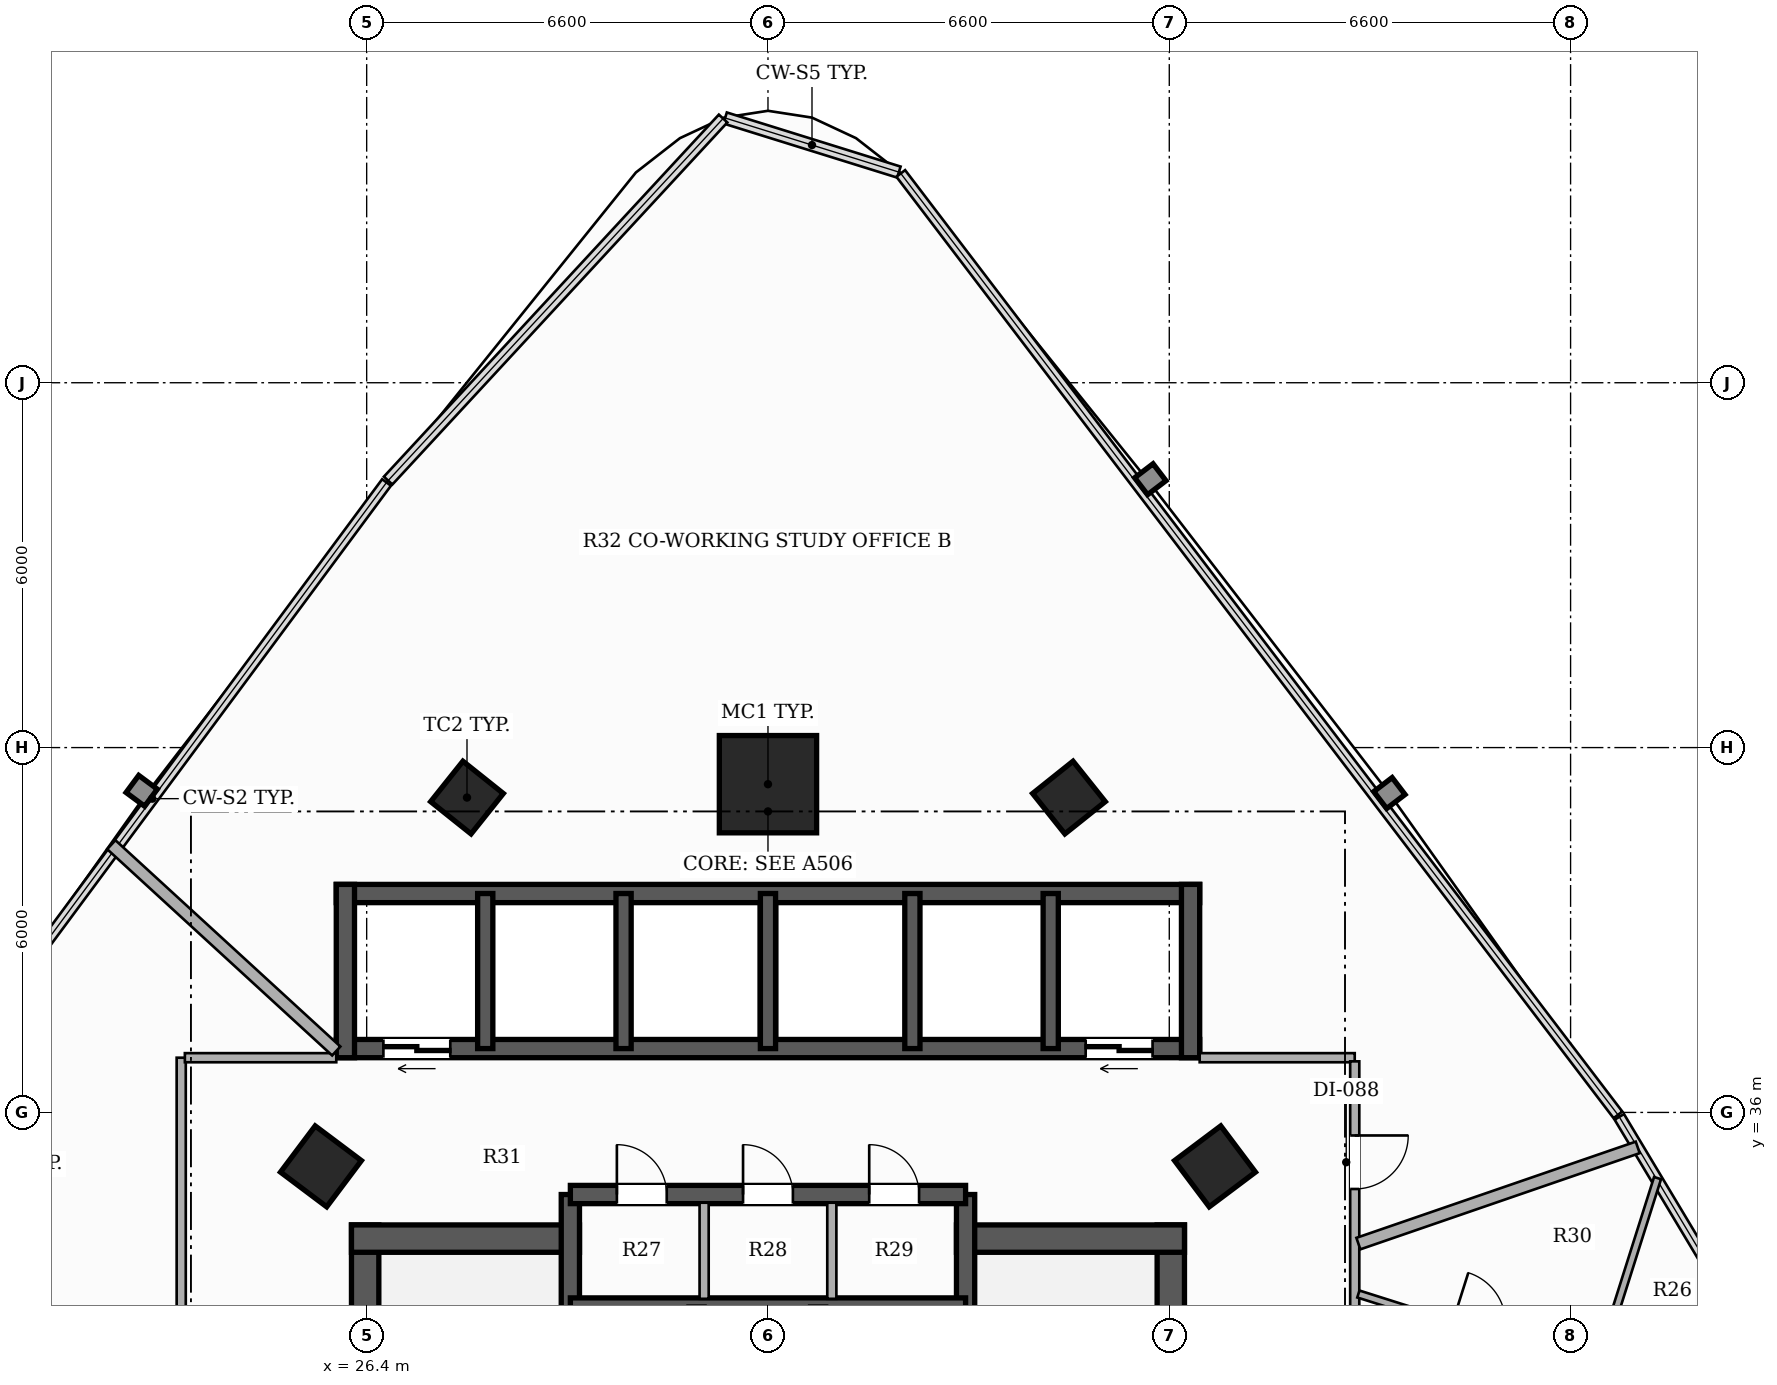
"""IFC4 building model, lengths in metres.
Left out: names, types, materials, properties, quantities, classifications, styles, units other than length and angle.
Written with IfcOpenShell. Run it as: python <this file> out.ifc"""

import sys

from ifc_helpers import new_model, si_unit, direction, frame, frame_2d, origin, origin_2d, place, context, subcontext, project, spatial, rectangle, hollow_rectangle, extrude, element, fill, save


model = new_model("IFC4")
c1 = context("Model", 3, precision=1e-05, world=origin(), true_north=direction((0.0, 1.0)))
c2 = subcontext(c1, "Body", "Model", "MODEL_VIEW")
j1 = project(units=[si_unit("LENGTHUNIT", "METRE"), si_unit("PLANEANGLEUNIT", "RADIAN")], contexts=[c1])
p1 = place(None, origin())
s1 = spatial("IfcSite", under=j1, at=p1, CompositionType="ELEMENT")
p2 = place(p1, origin())
s2 = spatial("IfcBuilding", under=s1, at=p2, CompositionType="ELEMENT")
p3 = place(p2, frame((0.0, 0.0, 36.8)))
s3 = spatial("IfcBuildingStorey", under=s2, at=p3, CompositionType="ELEMENT", Elevation=36.8)
p4 = place(p3, frame((26.375, 26.45, 0.0), z_axis=(0.0, 0.0, 1.0), x_axis=(0.0, 1.0, 0.0)))
e1 = element("IfcWall", 1, at=p4, inside=s3, PredefinedType="SHEAR", context=c2, shape_type="SweptSolid", body=[
    extrude(rectangle(XDim=7.7, YDim=0.45, at=frame_2d((3.85, 0.0))), origin(), (0.0, 0.0, 1.0), 3.3),
])
p5 = place(p3, frame((26.15, 33.925, 0.0), z_axis=(0.0, 0.0, 1.0), x_axis=(1.0, 0.0, 0.0)))
e2 = element("IfcWall", 2, at=p5, inside=s3, PredefinedType="SHEAR", context=c2, shape_type="SweptSolid", body=[
    extrude(rectangle(XDim=3.75, YDim=0.45, at=frame_2d((1.875, 0.0))), origin(), (0.0, 0.0, 1.0), 3.3),
])
p6 = place(p3, frame((39.625, 26.45, 0.0), z_axis=(0.0, 0.0, 1.0), x_axis=(0.0, 1.0, 0.0)))
e3 = element("IfcWall", 3, at=p6, inside=s3, PredefinedType="SHEAR", context=c2, shape_type="SweptSolid", body=[
    extrude(rectangle(XDim=7.7, YDim=0.45, at=frame_2d((3.85, 0.0))), origin(), (0.0, 0.0, 1.0), 3.3),
])
p7 = place(p3, frame((36.1, 33.925, 0.0), z_axis=(0.0, 0.0, 1.0), x_axis=(1.0, 0.0, 0.0)))
e4 = element("IfcWall", 4, at=p7, inside=s3, PredefinedType="SHEAR", context=c2, shape_type="SweptSolid", body=[
    extrude(rectangle(XDim=3.75, YDim=0.45, at=frame_2d((1.875, 0.0))), origin(), (0.0, 0.0, 1.0), 3.3),
])
p8 = place(p3, frame((29.75, 26.45, 0.0), z_axis=(0.0, 0.0, 1.0), x_axis=(0.0, 1.0, 0.0)))
e5 = element("IfcWall", 5, at=p8, inside=s3, PredefinedType="SHEAR", context=c2, shape_type="SweptSolid", body=[
    extrude(rectangle(XDim=8.2, YDim=0.3, at=frame_2d((4.1, 0.0))), origin(), (0.0, 0.0, 1.0), 3.3),
])
p9 = place(p8, frame((0.6, 0.0, 0.0)))
e6 = element("IfcOpeningElement", 6, at=p9, cuts=e5, PredefinedType="OPENING", context=c2, shape_type="SweptSolid", body=[
    extrude(rectangle(XDim=1.05, YDim=2.15, at=frame_2d((0.525, 1.075))), frame((0.0, 0.16, 0.0), z_axis=(0.0, -1.0, 0.0), x_axis=(1.0, 0.0, 0.0)), (0.0, 0.0, 1.0), 0.32),
])
p10 = place(p3, frame((36.25, 26.45, 0.0), z_axis=(0.0, 0.0, 1.0), x_axis=(0.0, 1.0, 0.0)))
e7 = element("IfcWall", 7, at=p10, inside=s3, PredefinedType="SHEAR", context=c2, shape_type="SweptSolid", body=[
    extrude(rectangle(XDim=8.2, YDim=0.3, at=frame_2d((4.1, 0.0))), origin(), (0.0, 0.0, 1.0), 3.3),
])
p11 = place(p10, frame((0.6, 0.0, 0.0)))
e8 = element("IfcOpeningElement", 8, at=p11, cuts=e7, PredefinedType="OPENING", context=c2, shape_type="SweptSolid", body=[
    extrude(rectangle(XDim=1.05, YDim=2.15, at=frame_2d((0.525, 1.075))), frame((0.0, 0.16, 0.0), z_axis=(0.0, -1.0, 0.0), x_axis=(1.0, 0.0, 0.0)), (0.0, 0.0, 1.0), 0.32),
])
p12 = place(p3, frame((29.75, 32.8, 0.0), z_axis=(0.0, 0.0, 1.0), x_axis=(1.0, 0.0, 0.0)))
e9 = element("IfcWall", 9, at=p12, inside=s3, PredefinedType="SHEAR", context=c2, shape_type="SweptSolid", body=[
    extrude(rectangle(XDim=6.5, YDim=0.3, at=frame_2d((3.25, 0.0))), origin(), (0.0, 0.0, 1.0), 3.3),
])
p13 = place(p3, frame((29.75, 34.65, 0.0), z_axis=(0.0, 0.0, 1.0), x_axis=(1.0, 0.0, 0.0)))
e10 = element("IfcWall", 10, at=p13, inside=s3, PredefinedType="SHEAR", context=c2, shape_type="SweptSolid", body=[
    extrude(rectangle(XDim=6.5, YDim=0.3, at=frame_2d((3.25, 0.0))), origin(), (0.0, 0.0, 1.0), 3.3),
])
p14 = place(p13, frame((0.765, 0.0, 0.0)))
e11 = element("IfcOpeningElement", 11, at=p14, cuts=e10, PredefinedType="OPENING", context=c2, shape_type="SweptSolid", body=[
    extrude(rectangle(XDim=0.82, YDim=2.1, at=frame_2d((0.41, 1.05))), frame((0.0, 0.16, 0.0), z_axis=(0.0, -1.0, 0.0), x_axis=(1.0, 0.0, 0.0)), (0.0, 0.0, 1.0), 0.32),
])
p15 = place(p13, frame((2.84, 0.0, 0.0)))
e12 = element("IfcOpeningElement", 12, at=p15, cuts=e10, PredefinedType="OPENING", context=c2, shape_type="SweptSolid", body=[
    extrude(rectangle(XDim=0.82, YDim=2.1, at=frame_2d((0.41, 1.05))), frame((0.0, 0.16, 0.0), z_axis=(0.0, -1.0, 0.0), x_axis=(1.0, 0.0, 0.0)), (0.0, 0.0, 1.0), 0.32),
])
p16 = place(p13, frame((4.915, 0.0, 0.0)))
e13 = element("IfcOpeningElement", 13, at=p16, cuts=e10, PredefinedType="OPENING", context=c2, shape_type="SweptSolid", body=[
    extrude(rectangle(XDim=0.82, YDim=2.1, at=frame_2d((0.41, 1.05))), frame((0.0, 0.16, 0.0), z_axis=(0.0, -1.0, 0.0), x_axis=(1.0, 0.0, 0.0)), (0.0, 0.0, 1.0), 0.32),
])
p17 = place(p3, frame((40.1, 37.05, 0.0), z_axis=(0.0, 0.0, 1.0), x_axis=(-1.0, 0.0, 0.0)))
e14 = element("IfcWall", 14, at=p17, inside=s3, PredefinedType="SHEAR", context=c2, shape_type="SweptSolid", body=[
    extrude(rectangle(XDim=14.2, YDim=0.3, at=frame_2d((7.1, 0.0))), origin(), (0.0, 0.0, 1.0), 3.3),
])
p18 = place(p17, frame((12.325, 0.0, 0.0)))
e15 = element("IfcOpeningElement", 15, at=p18, cuts=e14, PredefinedType="OPENING", context=c2, shape_type="SweptSolid", body=[
    extrude(rectangle(XDim=1.1, YDim=2.2, at=frame_2d((0.55, 1.1))), frame((0.0, 0.16, 0.0), z_axis=(0.0, -1.0, 0.0), x_axis=(1.0, 0.0, 0.0)), (0.0, 0.0, 1.0), 0.32),
])
p19 = place(p17, frame((0.775, 0.0, 0.0)))
e16 = element("IfcOpeningElement", 16, at=p19, cuts=e14, PredefinedType="OPENING", context=c2, shape_type="SweptSolid", body=[
    extrude(rectangle(XDim=1.1, YDim=2.2, at=frame_2d((0.55, 1.1))), frame((0.0, 0.16, 0.0), z_axis=(0.0, -1.0, 0.0), x_axis=(1.0, 0.0, 0.0)), (0.0, 0.0, 1.0), 0.32),
])
p20 = place(p3, frame((25.9, 39.6, 0.0), z_axis=(0.0, 0.0, 1.0), x_axis=(1.0, 0.0, 0.0)))
e17 = element("IfcWall", 17, at=p20, inside=s3, PredefinedType="SHEAR", context=c2, shape_type="SweptSolid", body=[
    extrude(rectangle(XDim=14.2, YDim=0.3, at=frame_2d((7.1, 0.0))), origin(), (0.0, 0.0, 1.0), 3.3),
])
for number, where, z_axis, x_axis in (
    (18, (26.05, 36.9, 0.0), (0.0, 0.0, 1.0), (0.0, 1.0, 0.0)),
    (19, (39.95, 36.9, 0.0), (0.0, 0.0, 1.0), (0.0, 1.0, 0.0)),
):
    element("IfcWall", number, at=place(p3, frame(where, z_axis=z_axis, x_axis=x_axis)), inside=s3, PredefinedType="SHEAR", context=c2, shape_type="SweptSolid", body=[
        extrude(rectangle(XDim=2.85, YDim=0.3, at=frame_2d((1.425, 0.0))), origin(), (0.0, 0.0, 1.0), 3.3),
    ])
for number, where, z_axis, x_axis in (
    (20, (28.35, 37.05, 0.0), (0.0, 0.0, 1.0), (0.0, 1.0, 0.0)),
    (21, (30.625, 37.05, 0.0), (0.0, 0.0, 1.0), (0.0, 1.0, 0.0)),
    (22, (33.0, 37.05, 0.0), (0.0, 0.0, 1.0), (0.0, 1.0, 0.0)),
    (23, (35.375, 37.05, 0.0), (0.0, 0.0, 1.0), (0.0, 1.0, 0.0)),
    (24, (37.65, 37.05, 0.0), (0.0, 0.0, 1.0), (0.0, 1.0, 0.0)),
):
    element("IfcWall", number, at=place(p3, frame(where, z_axis=z_axis, x_axis=x_axis)), inside=s3, PredefinedType="SHEAR", context=c2, shape_type="SweptSolid", body=[
        extrude(rectangle(XDim=2.55, YDim=0.25, at=frame_2d((1.275, 0.0))), origin(), (0.0, 0.0, 1.0), 3.3),
    ])
p21 = place(p3, frame((33.0, 41.398, 0.0), z_axis=(0.0, 0.0, 1.0), x_axis=(1.0, 0.0, 0.0)))
e25 = element("IfcColumn", 25, at=p21, inside=s3, PredefinedType="COLUMN", context=c2, shape_type="SweptSolid", body=[
    extrude(hollow_rectangle(XDim=1.6, YDim=1.6, WallThickness=0.05, at=origin_2d()), origin(), (0.0, 0.0, 1.0), 3.3),
])
for number, where, z_axis, x_axis in (
    (26, (25.648, 35.113, 0.0), (0.0, 0.0, 1.0), (0.6, 0.8, 0.0)),
    (27, (40.352, 35.113, 0.0), (0.0, 0.0, 1.0), (-0.6, 0.8, 0.0)),
):
    element("IfcColumn", number, at=place(p3, frame(where, z_axis=z_axis, x_axis=x_axis)), inside=s3, PredefinedType="COLUMN", context=c2, shape_type="SweptSolid", body=[
        extrude(hollow_rectangle(XDim=0.95, YDim=0.95, WallThickness=0.032, at=origin_2d()), origin(), (0.0, 0.0, 1.0), 3.3),
    ])
for number, where, z_axis, x_axis in (
    (28, (28.05, 41.178, 0.0), (0.0, 0.0, 1.0), (0.624, 0.782, 0.0)),
    (29, (37.95, 41.178, 0.0), (0.0, 0.0, 1.0), (-0.624, 0.782, 0.0)),
):
    element("IfcColumn", number, at=place(p3, frame(where, z_axis=z_axis, x_axis=x_axis)), inside=s3, PredefinedType="COLUMN", context=c2, shape_type="SweptSolid", body=[
        extrude(hollow_rectangle(XDim=0.85, YDim=0.85, WallThickness=0.028, at=origin_2d()), origin(), (0.0, 0.0, 1.0), 3.3),
    ])
for number, where, z_axis, x_axis in (
    (30, (31.95, 32.935, 0.0), (0.0, 0.0, 1.0), (0.0, 1.0, 0.0)),
    (31, (34.05, 32.935, 0.0), (0.0, 0.0, 1.0), (0.0, 1.0, 0.0)),
):
    element("IfcWall", number, at=place(p3, frame(where, z_axis=z_axis, x_axis=x_axis)), inside=s3, PredefinedType="PARTITIONING", context=c2, shape_type="SweptSolid", body=[
        extrude(rectangle(XDim=1.58, YDim=0.15, at=frame_2d((0.79, 0.0))), origin(), (0.0, 0.0, 1.0), 3.06),
    ])
p22 = place(p3, frame((40.1, 36.9, 0.0), z_axis=(0.0, 0.0, 1.0), x_axis=(1.0, 0.0, 0.0)))
e32 = element("IfcWall", 32, at=p22, inside=s3, PredefinedType="PARTITIONING", context=c2, shape_type="SweptSolid", body=[
    extrude(rectangle(XDim=2.55, YDim=0.15, at=frame_2d((1.275, 0.0))), origin(), (0.0, 0.0, 1.0), 2.413),
])
p23 = place(p3, frame((42.65, 36.84, 0.0), z_axis=(0.0, 0.0, 1.0), x_axis=(0.0, -1.0, 0.0)))
e33 = element("IfcWall", 33, at=p23, inside=s3, PredefinedType="PARTITIONING", context=c2, shape_type="SweptSolid", body=[
    extrude(rectangle(XDim=25.04, YDim=0.15, at=frame_2d((12.52, 0.0))), origin(), (0.0, 0.0, 1.0), 2.413),
])
p24 = place(p23, frame((1.219, 0.0, 0.0)))
e34 = element("IfcOpeningElement", 34, at=p24, cuts=e33, PredefinedType="OPENING", context=c2, shape_type="SweptSolid", body=[
    extrude(rectangle(XDim=0.88, YDim=2.1, at=frame_2d((0.44, 1.05))), frame((0.0, 0.085, 0.0), z_axis=(0.0, -1.0, 0.0), x_axis=(1.0, 0.0, 0.0)), (0.0, 0.0, 1.0), 0.17),
])
p25 = place(p23, frame((21.047, 0.0, 0.0)))
e35 = element("IfcOpeningElement", 35, at=p25, cuts=e33, PredefinedType="OPENING", context=c2, shape_type="SweptSolid", body=[
    extrude(rectangle(XDim=0.88, YDim=2.1, at=frame_2d((0.44, 1.05))), frame((0.0, 0.085, 0.0), z_axis=(0.0, -1.0, 0.0), x_axis=(1.0, 0.0, 0.0)), (0.0, 0.0, 1.0), 0.17),
])
p26 = place(p23, frame((16.029, 0.0, 0.0)))
e36 = element("IfcOpeningElement", 36, at=p26, cuts=e33, PredefinedType="OPENING", context=c2, shape_type="SweptSolid", body=[
    extrude(rectangle(XDim=0.92, YDim=2.15, at=frame_2d((0.46, 1.075))), frame((0.0, 0.085, 0.0), z_axis=(0.0, -1.0, 0.0), x_axis=(1.0, 0.0, 0.0)), (0.0, 0.0, 1.0), 0.17),
])
p27 = place(p23, frame((12.486, 0.0, 0.0)))
e37 = element("IfcOpeningElement", 37, at=p27, cuts=e33, PredefinedType="OPENING", context=c2, shape_type="SweptSolid", body=[
    extrude(rectangle(XDim=0.88, YDim=2.1, at=frame_2d((0.44, 1.05))), frame((0.0, 0.085, 0.0), z_axis=(0.0, -1.0, 0.0), x_axis=(1.0, 0.0, 0.0)), (0.0, 0.0, 1.0), 0.17),
])
p28 = place(p23, frame((6.638, 0.0, 0.0)))
e38 = element("IfcOpeningElement", 38, at=p28, cuts=e33, PredefinedType="OPENING", context=c2, shape_type="SweptSolid", body=[
    extrude(rectangle(XDim=0.92, YDim=2.15, at=frame_2d((0.46, 1.075))), frame((0.0, 0.085, 0.0), z_axis=(0.0, -1.0, 0.0), x_axis=(1.0, 0.0, 0.0)), (0.0, 0.0, 1.0), 0.17),
])
p29 = place(p3, frame((23.35, 11.86, 0.0), z_axis=(0.0, 0.0, 1.0), x_axis=(0.0, 1.0, 0.0)))
e39 = element("IfcWall", 39, at=p29, inside=s3, PredefinedType="PARTITIONING", context=c2, shape_type="SweptSolid", body=[
    extrude(rectangle(XDim=25.04, YDim=0.15, at=frame_2d((12.52, 0.0))), origin(), (0.0, 0.0, 1.0), 2.413),
])
p30 = place(p29, frame((9.29, 0.0, 0.0)))
e40 = element("IfcOpeningElement", 40, at=p30, cuts=e39, PredefinedType="OPENING", context=c2, shape_type="SweptSolid", body=[
    extrude(rectangle(XDim=0.92, YDim=2.15, at=frame_2d((0.46, 1.075))), frame((0.0, 0.085, 0.0), z_axis=(0.0, -1.0, 0.0), x_axis=(1.0, 0.0, 0.0)), (0.0, 0.0, 1.0), 0.17),
])
p31 = place(p29, frame((18.865, 0.0, 0.0)))
e41 = element("IfcOpeningElement", 41, at=p31, cuts=e39, PredefinedType="OPENING", context=c2, shape_type="SweptSolid", body=[
    extrude(rectangle(XDim=0.88, YDim=2.1, at=frame_2d((0.44, 1.05))), frame((0.0, 0.085, 0.0), z_axis=(0.0, -1.0, 0.0), x_axis=(1.0, 0.0, 0.0)), (0.0, 0.0, 1.0), 0.17),
])
p32 = place(p29, frame((2.566, 0.0, 0.0)))
e42 = element("IfcOpeningElement", 42, at=p32, cuts=e39, PredefinedType="OPENING", context=c2, shape_type="SweptSolid", body=[
    extrude(rectangle(XDim=0.92, YDim=2.15, at=frame_2d((0.46, 1.075))), frame((0.0, 0.085, 0.0), z_axis=(0.0, -1.0, 0.0), x_axis=(1.0, 0.0, 0.0)), (0.0, 0.0, 1.0), 0.17),
])
p33 = place(p3, frame((23.41, 36.9, 0.0), z_axis=(0.0, 0.0, 1.0), x_axis=(1.0, 0.0, 0.0)))
e43 = element("IfcWall", 43, at=p33, inside=s3, PredefinedType="PARTITIONING", context=c2, shape_type="SweptSolid", body=[
    extrude(rectangle(XDim=2.49, YDim=0.15, at=frame_2d((1.245, 0.0))), origin(), (0.0, 0.0, 1.0), 2.413),
])
p34 = place(p3, frame((25.9, 37.01, 0.0), z_axis=(0.0, 0.0, 1.0), x_axis=(-0.737010798249, 0.675880968266, 0.0)))
e44 = element("IfcWall", 44, at=p34, inside=s3, PredefinedType="PARTITIONING", context=c2, shape_type="SweptSolid", body=[
    extrude(rectangle(XDim=5.02, YDim=0.2, at=frame_2d((2.51, 0.0))), origin(), (0.0, 0.0, 1.0), 3.06),
])
p35 = place(p3, frame((47.304, 35.425, 0.0), z_axis=(0.0, 0.0, 1.0), x_axis=(-0.945506397197, -0.325603520956, 0.0)))
e45 = element("IfcWall", 45, at=p35, inside=s3, PredefinedType="PARTITIONING", context=c2, shape_type="SweptSolid", body=[
    extrude(rectangle(XDim=4.859, YDim=0.2, at=frame_2d((2.429, 0.0))), origin(), (0.0, 0.0, 1.0), 3.06),
])
p36 = place(p3, frame((42.71, 33.014, 0.0), z_axis=(0.0, 0.0, 1.0), x_axis=(0.953299814988, -0.302025599484, 0.0)))
e46 = element("IfcWall", 46, at=p36, inside=s3, PredefinedType="PARTITIONING", context=c2, shape_type="SweptSolid", body=[
    extrude(rectangle(XDim=4.115, YDim=0.12, at=frame_2d((2.058, 0.0))), origin(), (0.0, 0.0, 1.0), 3.06),
])
p37 = place(p36, frame((1.618, 0.0, 0.0)))
e47 = element("IfcOpeningElement", 47, at=p37, cuts=e46, PredefinedType="OPENING", context=c2, shape_type="SweptSolid", body=[
    extrude(rectangle(XDim=0.88, YDim=2.1, at=frame_2d((0.44, 1.05))), frame((0.0, 0.07, 0.0), z_axis=(0.0, -1.0, 0.0), x_axis=(1.0, 0.0, 0.0)), (0.0, 0.0, 1.0), 0.14),
])
p38 = place(p3, frame((46.633, 31.771, 0.0), z_axis=(0.0, 0.0, 1.0), x_axis=(0.301799891186, 0.953371294764, 0.0)))
e48 = element("IfcWall", 48, at=p38, inside=s3, PredefinedType="PARTITIONING", context=c2, shape_type="SweptSolid", body=[
    extrude(rectangle(XDim=3.303, YDim=0.12, at=frame_2d((1.651, 0.0))), origin(), (0.0, 0.0, 1.0), 3.06),
])
p39 = place(p18, origin())
e49 = element("IfcDoor", 49, at=p39, inside=s3, OperationType="DOUBLE_DOOR_SLIDING", PredefinedType="DOOR", context=c2, shape_type="SweptSolid", body=[
    extrude(rectangle(XDim=1.1, YDim=2.2, at=frame_2d((0.55, 1.1))), frame((0.0, 0.025, 0.0), z_axis=(0.0, -1.0, 0.0), x_axis=(1.0, 0.0, 0.0)), (0.0, 0.0, 1.0), 0.05),
])
fill(e15, e49)
p40 = place(p19, origin())
e50 = element("IfcDoor", 50, at=p40, inside=s3, OperationType="DOUBLE_DOOR_SLIDING", PredefinedType="DOOR", context=c2, shape_type="SweptSolid", body=[
    extrude(rectangle(XDim=1.1, YDim=2.2, at=frame_2d((0.55, 1.1))), frame((0.0, 0.025, 0.0), z_axis=(0.0, -1.0, 0.0), x_axis=(1.0, 0.0, 0.0)), (0.0, 0.0, 1.0), 0.05),
])
fill(e16, e50)
p41 = place(p14, origin())
e51 = element("IfcDoor", 51, at=p41, inside=s3, OperationType="SINGLE_SWING_LEFT", PredefinedType="DOOR", context=c2, shape_type="SweptSolid", body=[
    extrude(rectangle(XDim=0.82, YDim=2.1, at=frame_2d((0.41, 1.05))), frame((0.0, 0.025, 0.0), z_axis=(0.0, -1.0, 0.0), x_axis=(1.0, 0.0, 0.0)), (0.0, 0.0, 1.0), 0.05),
])
fill(e11, e51)
p42 = place(p15, origin())
e52 = element("IfcDoor", 52, at=p42, inside=s3, OperationType="SINGLE_SWING_LEFT", PredefinedType="DOOR", context=c2, shape_type="SweptSolid", body=[
    extrude(rectangle(XDim=0.82, YDim=2.1, at=frame_2d((0.41, 1.05))), frame((0.0, 0.025, 0.0), z_axis=(0.0, -1.0, 0.0), x_axis=(1.0, 0.0, 0.0)), (0.0, 0.0, 1.0), 0.05),
])
fill(e12, e52)
p43 = place(p16, origin())
e53 = element("IfcDoor", 53, at=p43, inside=s3, OperationType="SINGLE_SWING_LEFT", PredefinedType="DOOR", context=c2, shape_type="SweptSolid", body=[
    extrude(rectangle(XDim=0.82, YDim=2.1, at=frame_2d((0.41, 1.05))), frame((0.0, 0.025, 0.0), z_axis=(0.0, -1.0, 0.0), x_axis=(1.0, 0.0, 0.0)), (0.0, 0.0, 1.0), 0.05),
])
fill(e13, e53)
p44 = place(p24, origin())
e54 = element("IfcDoor", 54, at=p44, inside=s3, OperationType="SINGLE_SWING_LEFT", PredefinedType="DOOR", context=c2, shape_type="SweptSolid", body=[
    extrude(rectangle(XDim=0.88, YDim=2.1, at=frame_2d((0.44, 1.05))), frame((0.0, 0.025, 0.0), z_axis=(0.0, -1.0, 0.0), x_axis=(1.0, 0.0, 0.0)), (0.0, 0.0, 1.0), 0.05),
])
fill(e34, e54)
save(model, sys.argv[1])
